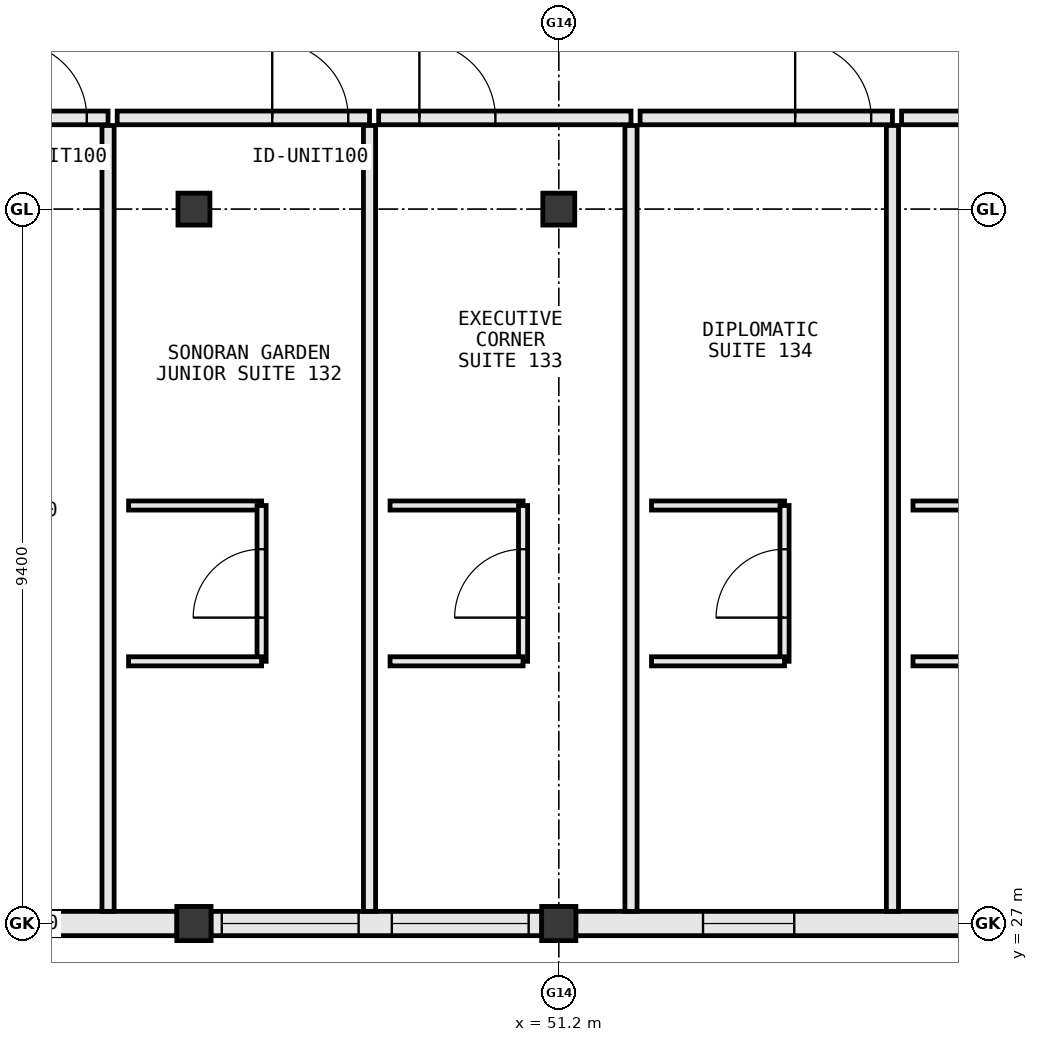
"""IFC4 building model, lengths in metres.
Left out: names, types, materials, properties, quantities, classifications, styles, units other than length and angle.
Written with IfcOpenShell. Run it as: python <this file> out.ifc"""

import sys

from ifc_helpers import new_model, si_unit, direction, frame, frame_2d, origin, origin_2d, place, context, subcontext, project, spatial, rectangle, extrude, element, fill, save


model = new_model("IFC4")
c1 = context("Model", 3, precision=1e-05, world=origin(), true_north=direction((0.0, 1.0)))
c2 = subcontext(c1, "Body", "Model", "MODEL_VIEW")
j1 = project(units=[si_unit("LENGTHUNIT", "METRE"), si_unit("PLANEANGLEUNIT", "RADIAN")], contexts=[c1])
p1 = place(None, origin())
s1 = spatial("IfcSite", under=j1, at=p1, CompositionType="ELEMENT")
p2 = place(p1, origin())
s2 = spatial("IfcBuilding", under=s1, at=p2, CompositionType="ELEMENT")
p3 = place(p2, frame((0.0, 0.0, 20.0)))
s3 = spatial("IfcBuildingStorey", under=s2, at=p3, CompositionType="ELEMENT", Elevation=20.0)
p4 = place(p3, frame((46.4, 27.0, 0.0), z_axis=(0.0, 0.0, 1.0), x_axis=(1.0, 0.0, 0.0)))
e1 = element("IfcColumn", 1, at=p4, inside=s3, PredefinedType="COLUMN", context=c2, shape_type="SweptSolid", body=[
    extrude(rectangle(XDim=0.45, YDim=0.45, at=origin_2d()), origin(), (0.0, 0.0, 1.0), 3.8),
])
p5 = place(p3, frame((46.4, 36.4, 0.0), z_axis=(0.0, 0.0, 1.0), x_axis=(1.0, 0.0, 0.0)))
e2 = element("IfcColumn", 2, at=p5, inside=s3, PredefinedType="COLUMN", context=c2, shape_type="SweptSolid", body=[
    extrude(rectangle(XDim=0.42, YDim=0.42, at=origin_2d()), origin(), (0.0, 0.0, 1.0), 3.8),
])
p6 = place(p3, frame((51.2, 27.0, 0.0), z_axis=(0.0, 0.0, 1.0), x_axis=(1.0, 0.0, 0.0)))
e3 = element("IfcColumn", 3, at=p6, inside=s3, PredefinedType="COLUMN", context=c2, shape_type="SweptSolid", body=[
    extrude(rectangle(XDim=0.45, YDim=0.45, at=origin_2d()), origin(), (0.0, 0.0, 1.0), 3.8),
])
p7 = place(p3, frame((51.2, 36.4, 0.0), z_axis=(0.0, 0.0, 1.0), x_axis=(1.0, 0.0, 0.0)))
e4 = element("IfcColumn", 4, at=p7, inside=s3, PredefinedType="COLUMN", context=c2, shape_type="SweptSolid", body=[
    extrude(rectangle(XDim=0.42, YDim=0.42, at=origin_2d()), origin(), (0.0, 0.0, 1.0), 3.8),
])
p8 = place(p3, frame((41.823, 27.0, 0.0), z_axis=(0.0, 0.0, 1.0), x_axis=(1.0, 0.0, 0.0)))
e5 = element("IfcWall", 5, at=p8, inside=s3, PredefinedType="STANDARD", context=c2, shape_type="SweptSolid", body=[
    extrude(rectangle(XDim=4.354, YDim=0.32, at=frame_2d((2.177, 0.0))), origin(), (0.0, 0.0, 1.0), 3.005),
])
p9 = place(p8, frame((1.577, 0.0, 0.85)))
e6 = element("IfcOpeningElement", 6, at=p9, cuts=e5, PredefinedType="OPENING", context=c2, shape_type="SweptSolid", body=[
    extrude(rectangle(XDim=1.2, YDim=1.55, at=frame_2d((0.6, 0.775))), frame((0.0, 0.172, 0.0), z_axis=(0.0, -1.0, 0.0), x_axis=(1.0, 0.0, 0.0)), (0.0, 0.0, 1.0), 0.344),
])
p10 = place(p3, frame((46.623, 27.0, 0.0), z_axis=(0.0, 0.0, 1.0), x_axis=(1.0, 0.0, 0.0)))
e7 = element("IfcWall", 7, at=p10, inside=s3, PredefinedType="STANDARD", context=c2, shape_type="SweptSolid", body=[
    extrude(rectangle(XDim=4.354, YDim=0.32, at=frame_2d((2.177, 0.0))), origin(), (0.0, 0.0, 1.0), 3.005),
])
p11 = place(p10, frame((0.144, 0.0, 0.85)))
e8 = element("IfcOpeningElement", 8, at=p11, cuts=e7, PredefinedType="OPENING", context=c2, shape_type="SweptSolid", body=[
    extrude(rectangle(XDim=1.8, YDim=1.85, at=frame_2d((0.9, 0.925))), frame((0.0, 0.172, 0.0), z_axis=(0.0, -1.0, 0.0), x_axis=(1.0, 0.0, 0.0)), (0.0, 0.0, 1.0), 0.344),
])
p12 = place(p10, frame((2.381, 0.0, 0.85)))
e9 = element("IfcOpeningElement", 9, at=p12, cuts=e7, PredefinedType="OPENING", context=c2, shape_type="SweptSolid", body=[
    extrude(rectangle(XDim=1.8, YDim=1.85, at=frame_2d((0.9, 0.925))), frame((0.0, 0.172, 0.0), z_axis=(0.0, -1.0, 0.0), x_axis=(1.0, 0.0, 0.0)), (0.0, 0.0, 1.0), 0.344),
])
p13 = place(p3, frame((51.423, 27.0, 0.0), z_axis=(0.0, 0.0, 1.0), x_axis=(1.0, 0.0, 0.0)))
e10 = element("IfcWall", 10, at=p13, inside=s3, PredefinedType="STANDARD", context=c2, shape_type="SweptSolid", body=[
    extrude(rectangle(XDim=9.099, YDim=0.32, at=frame_2d((4.549, 0.0))), origin(), (0.0, 0.0, 1.0), 2.785),
])
p14 = place(p13, frame((1.675, 0.0, 0.85)))
e11 = element("IfcOpeningElement", 11, at=p14, cuts=e10, PredefinedType="OPENING", context=c2, shape_type="SweptSolid", body=[
    extrude(rectangle(XDim=1.2, YDim=1.55, at=frame_2d((0.6, 0.775))), frame((0.0, 0.172, 0.0), z_axis=(0.0, -1.0, 0.0), x_axis=(1.0, 0.0, 0.0)), (0.0, 0.0, 1.0), 0.344),
])
p15 = place(p13, frame((6.224, 0.0, 0.85)))
e12 = element("IfcOpeningElement", 12, at=p15, cuts=e10, PredefinedType="OPENING", context=c2, shape_type="SweptSolid", body=[
    extrude(rectangle(XDim=1.2, YDim=1.55, at=frame_2d((0.6, 0.775))), frame((0.0, 0.172, 0.0), z_axis=(0.0, -1.0, 0.0), x_axis=(1.0, 0.0, 0.0)), (0.0, 0.0, 1.0), 0.344),
])
p16 = place(p3, frame((45.27, 37.6, 0.0), z_axis=(0.0, 0.0, 1.0), x_axis=(-1.0, 0.0, 0.0)))
e13 = element("IfcWall", 13, at=p16, inside=s3, PredefinedType="PARTITIONING", context=c2, shape_type="SweptSolid", body=[
    extrude(rectangle(XDim=3.32, YDim=0.18, at=frame_2d((1.66, 0.0))), origin(), (0.0, 0.0, 1.0), 3.55),
])
p17 = place(p16, frame((0.28, 0.0, 0.0)))
e14 = element("IfcOpeningElement", 14, at=p17, cuts=e13, PredefinedType="OPENING", context=c2, shape_type="SweptSolid", body=[
    extrude(rectangle(XDim=1.0, YDim=2.2, at=frame_2d((0.5, 1.1))), frame((0.0, 0.102, 0.0), z_axis=(0.0, -1.0, 0.0), x_axis=(1.0, 0.0, 0.0)), (0.0, 0.0, 1.0), 0.204),
])
p18 = place(p3, frame((45.27, 27.16, 0.0), z_axis=(0.0, 0.0, 1.0), x_axis=(0.0, 1.0, 0.0)))
e15 = element("IfcWall", 15, at=p18, inside=s3, PredefinedType="PARTITIONING", context=c2, shape_type="SweptSolid", body=[
    extrude(rectangle(XDim=10.34, YDim=0.16, at=frame_2d((5.17, 0.0))), origin(), (0.0, 0.0, 1.0), 3.55),
])
p19 = place(p3, frame((48.71, 37.6, 0.0), z_axis=(0.0, 0.0, 1.0), x_axis=(-1.0, 0.0, 0.0)))
e16 = element("IfcWall", 16, at=p19, inside=s3, PredefinedType="PARTITIONING", context=c2, shape_type="SweptSolid", body=[
    extrude(rectangle(XDim=3.32, YDim=0.18, at=frame_2d((1.66, 0.0))), origin(), (0.0, 0.0, 1.0), 3.55),
])
p20 = place(p19, frame((0.28, 0.0, 0.0)))
e17 = element("IfcOpeningElement", 17, at=p20, cuts=e16, PredefinedType="OPENING", context=c2, shape_type="SweptSolid", body=[
    extrude(rectangle(XDim=1.0, YDim=2.2, at=frame_2d((0.5, 1.1))), frame((0.0, 0.102, 0.0), z_axis=(0.0, -1.0, 0.0), x_axis=(1.0, 0.0, 0.0)), (0.0, 0.0, 1.0), 0.204),
])
p21 = place(p3, frame((48.71, 27.16, 0.0), z_axis=(0.0, 0.0, 1.0), x_axis=(0.0, 1.0, 0.0)))
e18 = element("IfcWall", 18, at=p21, inside=s3, PredefinedType="PARTITIONING", context=c2, shape_type="SweptSolid", body=[
    extrude(rectangle(XDim=10.34, YDim=0.16, at=frame_2d((5.17, 0.0))), origin(), (0.0, 0.0, 1.0), 3.05),
])
p22 = place(p3, frame((45.54, 32.5, 0.0), z_axis=(0.0, 0.0, 1.0), x_axis=(1.0, 0.0, 0.0)))
e19 = element("IfcWall", 19, at=p22, inside=s3, PredefinedType="PARTITIONING", context=c2, shape_type="SweptSolid", body=[
    extrude(rectangle(XDim=1.75, YDim=0.12, at=frame_2d((0.875, 0.0))), origin(), (0.0, 0.0, 1.0), 3.55),
])
p23 = place(p3, frame((47.29, 30.45, 0.0), z_axis=(0.0, 0.0, 1.0), x_axis=(0.0, 1.0, 0.0)))
e20 = element("IfcWall", 20, at=p23, inside=s3, PredefinedType="PARTITIONING", context=c2, shape_type="SweptSolid", body=[
    extrude(rectangle(XDim=2.05, YDim=0.12, at=frame_2d((1.025, 0.0))), origin(), (0.0, 0.0, 1.0), 3.55),
])
p24 = place(p23, frame((0.575, 0.0, 0.0)))
e21 = element("IfcOpeningElement", 21, at=p24, cuts=e20, PredefinedType="OPENING", context=c2, shape_type="SweptSolid", body=[
    extrude(rectangle(XDim=0.9, YDim=2.15, at=frame_2d((0.45, 1.075))), frame((0.0, 0.072, 0.0), z_axis=(0.0, -1.0, 0.0), x_axis=(1.0, 0.0, 0.0)), (0.0, 0.0, 1.0), 0.144),
])
p25 = place(p3, frame((45.54, 30.45, 0.0), z_axis=(0.0, 0.0, 1.0), x_axis=(1.0, 0.0, 0.0)))
e22 = element("IfcWall", 22, at=p25, inside=s3, PredefinedType="PARTITIONING", context=c2, shape_type="SweptSolid", body=[
    extrude(rectangle(XDim=1.75, YDim=0.12, at=frame_2d((0.875, 0.0))), origin(), (0.0, 0.0, 1.0), 3.55),
])
p26 = place(p3, frame((52.15, 37.6, 0.0), z_axis=(0.0, 0.0, 1.0), x_axis=(-1.0, 0.0, 0.0)))
e23 = element("IfcWall", 23, at=p26, inside=s3, PredefinedType="PARTITIONING", context=c2, shape_type="SweptSolid", body=[
    extrude(rectangle(XDim=3.32, YDim=0.18, at=frame_2d((1.66, 0.0))), origin(), (0.0, 0.0, 1.0), 3.55),
])
p27 = place(p26, frame((1.784, 0.0, 0.0)))
e24 = element("IfcOpeningElement", 24, at=p27, cuts=e23, PredefinedType="OPENING", context=c2, shape_type="SweptSolid", body=[
    extrude(rectangle(XDim=1.0, YDim=2.2, at=frame_2d((0.5, 1.1))), frame((0.0, 0.102, 0.0), z_axis=(0.0, -1.0, 0.0), x_axis=(1.0, 0.0, 0.0)), (0.0, 0.0, 1.0), 0.204),
])
p28 = place(p3, frame((52.15, 27.16, 0.0), z_axis=(0.0, 0.0, 1.0), x_axis=(0.0, 1.0, 0.0)))
e25 = element("IfcWall", 25, at=p28, inside=s3, PredefinedType="PARTITIONING", context=c2, shape_type="SweptSolid", body=[
    extrude(rectangle(XDim=10.34, YDim=0.16, at=frame_2d((5.17, 0.0))), origin(), (0.0, 0.0, 1.0), 3.55),
])
p29 = place(p3, frame((48.98, 32.5, 0.0), z_axis=(0.0, 0.0, 1.0), x_axis=(1.0, 0.0, 0.0)))
e26 = element("IfcWall", 26, at=p29, inside=s3, PredefinedType="PARTITIONING", context=c2, shape_type="SweptSolid", body=[
    extrude(rectangle(XDim=1.75, YDim=0.12, at=frame_2d((0.875, 0.0))), origin(), (0.0, 0.0, 1.0), 3.55),
])
p30 = place(p3, frame((50.73, 30.45, 0.0), z_axis=(0.0, 0.0, 1.0), x_axis=(0.0, 1.0, 0.0)))
e27 = element("IfcWall", 27, at=p30, inside=s3, PredefinedType="PARTITIONING", context=c2, shape_type="SweptSolid", body=[
    extrude(rectangle(XDim=2.05, YDim=0.12, at=frame_2d((1.025, 0.0))), origin(), (0.0, 0.0, 1.0), 3.55),
])
p31 = place(p30, frame((0.575, 0.0, 0.0)))
e28 = element("IfcOpeningElement", 28, at=p31, cuts=e27, PredefinedType="OPENING", context=c2, shape_type="SweptSolid", body=[
    extrude(rectangle(XDim=0.9, YDim=2.15, at=frame_2d((0.45, 1.075))), frame((0.0, 0.072, 0.0), z_axis=(0.0, -1.0, 0.0), x_axis=(1.0, 0.0, 0.0)), (0.0, 0.0, 1.0), 0.144),
])
p32 = place(p3, frame((48.98, 30.45, 0.0), z_axis=(0.0, 0.0, 1.0), x_axis=(1.0, 0.0, 0.0)))
e29 = element("IfcWall", 29, at=p32, inside=s3, PredefinedType="PARTITIONING", context=c2, shape_type="SweptSolid", body=[
    extrude(rectangle(XDim=1.75, YDim=0.12, at=frame_2d((0.875, 0.0))), origin(), (0.0, 0.0, 1.0), 3.55),
])
p33 = place(p3, frame((55.59, 37.6, 0.0), z_axis=(0.0, 0.0, 1.0), x_axis=(-1.0, 0.0, 0.0)))
e30 = element("IfcWall", 30, at=p33, inside=s3, PredefinedType="PARTITIONING", context=c2, shape_type="SweptSolid", body=[
    extrude(rectangle(XDim=3.32, YDim=0.18, at=frame_2d((1.66, 0.0))), origin(), (0.0, 0.0, 1.0), 3.55),
])
p34 = place(p33, frame((0.28, 0.0, 0.0)))
e31 = element("IfcOpeningElement", 31, at=p34, cuts=e30, PredefinedType="OPENING", context=c2, shape_type="SweptSolid", body=[
    extrude(rectangle(XDim=1.0, YDim=2.2, at=frame_2d((0.5, 1.1))), frame((0.0, 0.102, 0.0), z_axis=(0.0, -1.0, 0.0), x_axis=(1.0, 0.0, 0.0)), (0.0, 0.0, 1.0), 0.204),
])
p35 = place(p3, frame((55.59, 27.16, 0.0), z_axis=(0.0, 0.0, 1.0), x_axis=(0.0, 1.0, 0.0)))
e32 = element("IfcWall", 32, at=p35, inside=s3, PredefinedType="PARTITIONING", context=c2, shape_type="SweptSolid", body=[
    extrude(rectangle(XDim=10.34, YDim=0.16, at=frame_2d((5.17, 0.0))), origin(), (0.0, 0.0, 1.0), 3.55),
])
p36 = place(p3, frame((52.42, 32.5, 0.0), z_axis=(0.0, 0.0, 1.0), x_axis=(1.0, 0.0, 0.0)))
e33 = element("IfcWall", 33, at=p36, inside=s3, PredefinedType="PARTITIONING", context=c2, shape_type="SweptSolid", body=[
    extrude(rectangle(XDim=1.75, YDim=0.12, at=frame_2d((0.875, 0.0))), origin(), (0.0, 0.0, 1.0), 3.55),
])
p37 = place(p3, frame((54.17, 30.45, 0.0), z_axis=(0.0, 0.0, 1.0), x_axis=(0.0, 1.0, 0.0)))
e34 = element("IfcWall", 34, at=p37, inside=s3, PredefinedType="PARTITIONING", context=c2, shape_type="SweptSolid", body=[
    extrude(rectangle(XDim=2.05, YDim=0.12, at=frame_2d((1.025, 0.0))), origin(), (0.0, 0.0, 1.0), 3.095),
])
p38 = place(p37, frame((0.575, 0.0, 0.0)))
e35 = element("IfcOpeningElement", 35, at=p38, cuts=e34, PredefinedType="OPENING", context=c2, shape_type="SweptSolid", body=[
    extrude(rectangle(XDim=0.9, YDim=2.15, at=frame_2d((0.45, 1.075))), frame((0.0, 0.072, 0.0), z_axis=(0.0, -1.0, 0.0), x_axis=(1.0, 0.0, 0.0)), (0.0, 0.0, 1.0), 0.144),
])
p39 = place(p3, frame((52.42, 30.45, 0.0), z_axis=(0.0, 0.0, 1.0), x_axis=(1.0, 0.0, 0.0)))
e36 = element("IfcWall", 36, at=p39, inside=s3, PredefinedType="PARTITIONING", context=c2, shape_type="SweptSolid", body=[
    extrude(rectangle(XDim=1.75, YDim=0.12, at=frame_2d((0.875, 0.0))), origin(), (0.0, 0.0, 1.0), 3.55),
])
p40 = place(p3, frame((60.33, 37.6, 0.0), z_axis=(0.0, 0.0, 1.0), x_axis=(-1.0, 0.0, 0.0)))
e37 = element("IfcWall", 37, at=p40, inside=s3, PredefinedType="PARTITIONING", context=c2, shape_type="SweptSolid", body=[
    extrude(rectangle(XDim=4.62, YDim=0.18, at=frame_2d((2.31, 0.0))), origin(), (0.0, 0.0, 1.0), 3.55),
])
p41 = place(p40, frame((0.83, 0.0, 0.0)))
e38 = element("IfcOpeningElement", 38, at=p41, cuts=e37, PredefinedType="OPENING", context=c2, shape_type="SweptSolid", body=[
    extrude(rectangle(XDim=1.0, YDim=2.2, at=frame_2d((0.5, 1.1))), frame((0.0, 0.102, 0.0), z_axis=(0.0, -1.0, 0.0), x_axis=(1.0, 0.0, 0.0)), (0.0, 0.0, 1.0), 0.204),
])
for number, where, z_axis, x_axis in (
    (39, (55.86, 32.5, 0.0), (0.0, 0.0, 1.0), (1.0, 0.0, 0.0)),
    (40, (55.86, 30.45, 0.0), (0.0, 0.0, 1.0), (1.0, 0.0, 0.0)),
):
    element("IfcWall", number, at=place(p3, frame(where, z_axis=z_axis, x_axis=x_axis)), inside=s3, PredefinedType="PARTITIONING", context=c2, shape_type="SweptSolid", body=[
        extrude(rectangle(XDim=1.75, YDim=0.12, at=frame_2d((0.875, 0.0))), origin(), (0.0, 0.0, 1.0), 3.55),
    ])
p42 = place(p9, origin())
e41 = element("IfcWindow", 41, at=p42, inside=s3, PartitioningType="SINGLE_PANEL", PredefinedType="WINDOW", context=c2, shape_type="SweptSolid", body=[
    extrude(rectangle(XDim=1.2, YDim=1.55, at=frame_2d((0.6, 0.775))), frame((0.0, 0.03, 0.0), z_axis=(0.0, -1.0, 0.0), x_axis=(1.0, 0.0, 0.0)), (0.0, 0.0, 1.0), 0.06),
])
fill(e6, e41)
p43 = place(p14, origin())
e42 = element("IfcWindow", 42, at=p43, inside=s3, PartitioningType="SINGLE_PANEL", PredefinedType="WINDOW", context=c2, shape_type="SweptSolid", body=[
    extrude(rectangle(XDim=1.2, YDim=1.55, at=frame_2d((0.6, 0.775))), frame((0.0, 0.03, 0.0), z_axis=(0.0, -1.0, 0.0), x_axis=(1.0, 0.0, 0.0)), (0.0, 0.0, 1.0), 0.06),
])
fill(e11, e42)
p44 = place(p11, origin())
e43 = element("IfcWindow", 43, at=p44, inside=s3, PartitioningType="SINGLE_PANEL", PredefinedType="WINDOW", context=c2, shape_type="SweptSolid", body=[
    extrude(rectangle(XDim=1.8, YDim=1.85, at=frame_2d((0.9, 0.925))), frame((0.0, 0.03, 0.0), z_axis=(0.0, -1.0, 0.0), x_axis=(1.0, 0.0, 0.0)), (0.0, 0.0, 1.0), 0.06),
])
fill(e8, e43)
p45 = place(p12, origin())
e44 = element("IfcWindow", 44, at=p45, inside=s3, PartitioningType="SINGLE_PANEL", PredefinedType="WINDOW", context=c2, shape_type="SweptSolid", body=[
    extrude(rectangle(XDim=1.8, YDim=1.85, at=frame_2d((0.9, 0.925))), frame((0.0, 0.03, 0.0), z_axis=(0.0, -1.0, 0.0), x_axis=(1.0, 0.0, 0.0)), (0.0, 0.0, 1.0), 0.06),
])
fill(e9, e44)
p46 = place(p17, frame((1.0, 0.0, 0.0), z_axis=(0.0, 0.0, 1.0), x_axis=(-1.0, 0.0, 0.0)))
e45 = element("IfcDoor", 45, at=p46, inside=s3, OperationType="SINGLE_SWING_RIGHT", PredefinedType="DOOR", context=c2, shape_type="SweptSolid", body=[
    extrude(rectangle(XDim=1.0, YDim=2.2, at=frame_2d((0.5, 1.1))), frame((0.0, 0.025, 0.0), z_axis=(0.0, -1.0, 0.0), x_axis=(1.0, 0.0, 0.0)), (0.0, 0.0, 1.0), 0.05),
])
fill(e14, e45)
p47 = place(p20, frame((1.0, 0.0, 0.0), z_axis=(0.0, 0.0, 1.0), x_axis=(-1.0, 0.0, 0.0)))
e46 = element("IfcDoor", 46, at=p47, inside=s3, OperationType="SINGLE_SWING_RIGHT", PredefinedType="DOOR", context=c2, shape_type="SweptSolid", body=[
    extrude(rectangle(XDim=1.0, YDim=2.2, at=frame_2d((0.5, 1.1))), frame((0.0, 0.025, 0.0), z_axis=(0.0, -1.0, 0.0), x_axis=(1.0, 0.0, 0.0)), (0.0, 0.0, 1.0), 0.05),
])
fill(e17, e46)
p48 = place(p24, origin())
e47 = element("IfcDoor", 47, at=p48, inside=s3, OperationType="SINGLE_SWING_LEFT", PredefinedType="DOOR", context=c2, shape_type="SweptSolid", body=[
    extrude(rectangle(XDim=0.9, YDim=2.15, at=frame_2d((0.45, 1.075))), frame((0.0, 0.025, 0.0), z_axis=(0.0, -1.0, 0.0), x_axis=(1.0, 0.0, 0.0)), (0.0, 0.0, 1.0), 0.05),
])
fill(e21, e47)
p49 = place(p27, frame((1.0, 0.0, 0.0), z_axis=(0.0, 0.0, 1.0), x_axis=(-1.0, 0.0, 0.0)))
e48 = element("IfcDoor", 48, at=p49, inside=s3, OperationType="SINGLE_SWING_RIGHT", PredefinedType="DOOR", context=c2, shape_type="SweptSolid", body=[
    extrude(rectangle(XDim=1.0, YDim=2.2, at=frame_2d((0.5, 1.1))), frame((0.0, 0.025, 0.0), z_axis=(0.0, -1.0, 0.0), x_axis=(1.0, 0.0, 0.0)), (0.0, 0.0, 1.0), 0.05),
])
fill(e24, e48)
p50 = place(p31, origin())
e49 = element("IfcDoor", 49, at=p50, inside=s3, OperationType="SINGLE_SWING_LEFT", PredefinedType="DOOR", context=c2, shape_type="SweptSolid", body=[
    extrude(rectangle(XDim=0.9, YDim=2.15, at=frame_2d((0.45, 1.075))), frame((0.0, 0.025, 0.0), z_axis=(0.0, -1.0, 0.0), x_axis=(1.0, 0.0, 0.0)), (0.0, 0.0, 1.0), 0.05),
])
fill(e28, e49)
p51 = place(p34, frame((1.0, 0.0, 0.0), z_axis=(0.0, 0.0, 1.0), x_axis=(-1.0, 0.0, 0.0)))
e50 = element("IfcDoor", 50, at=p51, inside=s3, OperationType="SINGLE_SWING_RIGHT", PredefinedType="DOOR", context=c2, shape_type="SweptSolid", body=[
    extrude(rectangle(XDim=1.0, YDim=2.2, at=frame_2d((0.5, 1.1))), frame((0.0, 0.025, 0.0), z_axis=(0.0, -1.0, 0.0), x_axis=(1.0, 0.0, 0.0)), (0.0, 0.0, 1.0), 0.05),
])
fill(e31, e50)
p52 = place(p38, origin())
e51 = element("IfcDoor", 51, at=p52, inside=s3, OperationType="SINGLE_SWING_LEFT", PredefinedType="DOOR", context=c2, shape_type="SweptSolid", body=[
    extrude(rectangle(XDim=0.9, YDim=2.15, at=frame_2d((0.45, 1.075))), frame((0.0, 0.025, 0.0), z_axis=(0.0, -1.0, 0.0), x_axis=(1.0, 0.0, 0.0)), (0.0, 0.0, 1.0), 0.05),
])
fill(e35, e51)
save(model, sys.argv[1])
